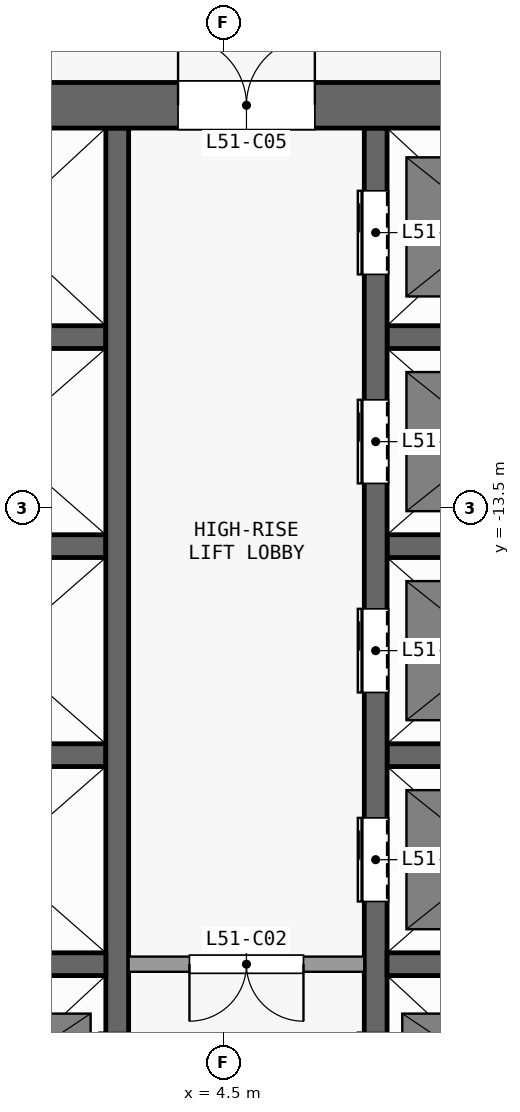
"""IFC4 building model, lengths in metres.
Left out: names, types, materials, properties, quantities, classifications, styles, units other than length and angle.
Written with IfcOpenShell. Run it as: python <this file> out.ifc"""

import sys

from ifc_helpers import new_model, si_unit, direction, frame, frame_2d, origin, place, context, subcontext, project, spatial, rectangle, extrude, element, fill, save


model = new_model("IFC4")
c1 = context("Model", 3, precision=1e-05, world=origin(), true_north=direction((0.0, 1.0)))
c2 = subcontext(c1, "Body", "Model", "MODEL_VIEW")
j1 = project(units=[si_unit("LENGTHUNIT", "METRE"), si_unit("PLANEANGLEUNIT", "RADIAN")], contexts=[c1])
p1 = place(None, origin())
s1 = spatial("IfcSite", under=j1, at=p1, CompositionType="ELEMENT")
p2 = place(p1, origin())
s2 = spatial("IfcBuilding", under=s1, at=p2, CompositionType="ELEMENT")
p3 = place(p2, frame((0.0, 0.0, 205.1)))
s3 = spatial("IfcBuildingStorey", under=s2, at=p3, CompositionType="ELEMENT", Elevation=205.1)
p4 = place(p3, frame((-13.2, -8.2, 0.0), z_axis=(0.0, 0.0, 1.0), x_axis=(1.0, 0.0, 0.0)))
e1 = element("IfcWall", 1, at=p4, inside=s3, PredefinedType="SHEAR", context=c2, shape_type="SweptSolid", body=[
    extrude(rectangle(XDim=26.4, YDim=0.6, at=frame_2d((13.2, 0.0))), origin(), (0.0, 0.0, 1.0), 3.3),
])
p5 = place(p4, frame((7.5, 0.0, 0.0)))
e2 = element("IfcOpeningElement", 2, at=p5, cuts=e1, PredefinedType="OPENING", context=c2, shape_type="SweptSolid", body=[
    extrude(rectangle(XDim=1.8, YDim=2.1, at=frame_2d((0.9, 1.05))), frame((0.0, 0.31, 0.0), z_axis=(0.0, -1.0, 0.0), x_axis=(1.0, 0.0, 0.0)), (0.0, 0.0, 1.0), 0.62),
])
p6 = place(p4, frame((17.1, 0.0, 0.0)))
e3 = element("IfcOpeningElement", 3, at=p6, cuts=e1, PredefinedType="OPENING", context=c2, shape_type="SweptSolid", body=[
    extrude(rectangle(XDim=1.8, YDim=2.1, at=frame_2d((0.9, 1.05))), frame((0.0, 0.31, 0.0), z_axis=(0.0, -1.0, 0.0), x_axis=(1.0, 0.0, 0.0)), (0.0, 0.0, 1.0), 0.62),
])
p7 = place(p4, frame((2.425, 0.0, 0.0)))
e4 = element("IfcOpeningElement", 4, at=p7, cuts=e1, PredefinedType="OPENING", context=c2, shape_type="SweptSolid", body=[
    extrude(rectangle(XDim=0.9, YDim=2.1, at=frame_2d((0.45, 1.05))), frame((0.0, 0.31, 0.0), z_axis=(0.0, -1.0, 0.0), x_axis=(1.0, 0.0, 0.0)), (0.0, 0.0, 1.0), 0.62),
])
p8 = place(p4, frame((23.775, 0.0, 0.0)))
e5 = element("IfcOpeningElement", 5, at=p8, cuts=e1, PredefinedType="OPENING", context=c2, shape_type="SweptSolid", body=[
    extrude(rectangle(XDim=1.2, YDim=2.1, at=frame_2d((0.6, 1.05))), frame((0.0, 0.31, 0.0), z_axis=(0.0, -1.0, 0.0), x_axis=(1.0, 0.0, 0.0)), (0.0, 0.0, 1.0), 0.62),
])
p9 = place(p3, frame((0.15, -19.5, 0.0), z_axis=(0.0, 0.0, 1.0), x_axis=(1.0, 0.0, 0.0)))
e6 = element("IfcWall", 6, at=p9, inside=s3, PredefinedType="SHEAR", context=c2, shape_type="SweptSolid", body=[
    extrude(rectangle(XDim=2.8, YDim=0.3, at=frame_2d((1.4, 0.0))), origin(), (0.0, 0.0, 1.0), 3.3),
])
p10 = place(p3, frame((6.35, -19.5, 0.0), z_axis=(0.0, 0.0, 1.0), x_axis=(-1.0, 0.0, 0.0)))
e7 = element("IfcWall", 7, at=p10, inside=s3, PredefinedType="PARTITIONING", context=c2, shape_type="SweptSolid", body=[
    extrude(rectangle(XDim=3.1, YDim=0.2, at=frame_2d((1.55, 0.0))), origin(), (0.0, 0.0, 1.0), 3.3),
])
p11 = place(p10, frame((0.8, 0.0, 0.0)))
e8 = element("IfcOpeningElement", 8, at=p11, cuts=e7, PredefinedType="OPENING", context=c2, shape_type="SweptSolid", body=[
    extrude(rectangle(XDim=1.5, YDim=2.1, at=frame_2d((0.75, 1.05))), frame((0.0, 0.11, 0.0), z_axis=(0.0, -1.0, 0.0), x_axis=(1.0, 0.0, 0.0)), (0.0, 0.0, 1.0), 0.22),
])
for number, where, z_axis, x_axis in (
    (9, (6.65, -19.5, 0.0), (0.0, 0.0, 1.0), (1.0, 0.0, 0.0)),
    (10, (0.15, -16.75, 0.0), (0.0, 0.0, 1.0), (1.0, 0.0, 0.0)),
    (11, (6.65, -16.75, 0.0), (0.0, 0.0, 1.0), (1.0, 0.0, 0.0)),
    (12, (0.15, -14.0, 0.0), (0.0, 0.0, 1.0), (1.0, 0.0, 0.0)),
    (13, (6.65, -14.0, 0.0), (0.0, 0.0, 1.0), (1.0, 0.0, 0.0)),
    (14, (0.15, -11.25, 0.0), (0.0, 0.0, 1.0), (1.0, 0.0, 0.0)),
    (15, (6.65, -11.25, 0.0), (0.0, 0.0, 1.0), (1.0, 0.0, 0.0)),
):
    element("IfcWall", number, at=place(p3, frame(where, z_axis=z_axis, x_axis=x_axis)), inside=s3, PredefinedType="SHEAR", context=c2, shape_type="SweptSolid", body=[
        extrude(rectangle(XDim=2.8, YDim=0.3, at=frame_2d((1.4, 0.0))), origin(), (0.0, 0.0, 1.0), 3.3),
    ])
p12 = place(p3, frame((3.1, -22.55, 0.0), z_axis=(0.0, 0.0, 1.0), x_axis=(0.0, 1.0, 0.0)))
e16 = element("IfcWall", 16, at=p12, inside=s3, PredefinedType="SHEAR", context=c2, shape_type="SweptSolid", body=[
    extrude(rectangle(XDim=14.05, YDim=0.3, at=frame_2d((7.025, 0.0))), origin(), (0.0, 0.0, 1.0), 3.3),
])
p13 = place(p12, frame((1.05, 0.0, 0.0)))
e17 = element("IfcOpeningElement", 17, at=p13, cuts=e16, PredefinedType="OPENING", context=c2, shape_type="SweptSolid", body=[
    extrude(rectangle(XDim=1.1, YDim=2.1, at=frame_2d((0.55, 1.05))), frame((0.0, 0.16, 0.0), z_axis=(0.0, -1.0, 0.0), x_axis=(1.0, 0.0, 0.0)), (0.0, 0.0, 1.0), 0.32),
])
p14 = place(p3, frame((6.5, -22.55, 0.0), z_axis=(0.0, 0.0, 1.0), x_axis=(0.0, 1.0, 0.0)))
e18 = element("IfcWall", 18, at=p14, inside=s3, PredefinedType="SHEAR", context=c2, shape_type="SweptSolid", body=[
    extrude(rectangle(XDim=14.05, YDim=0.3, at=frame_2d((7.025, 0.0))), origin(), (0.0, 0.0, 1.0), 3.3),
])
p15 = place(p14, frame((1.05, 0.0, 0.0)))
e19 = element("IfcOpeningElement", 19, at=p15, cuts=e18, PredefinedType="OPENING", context=c2, shape_type="SweptSolid", body=[
    extrude(rectangle(XDim=1.1, YDim=2.1, at=frame_2d((0.55, 1.05))), frame((0.0, 0.16, 0.0), z_axis=(0.0, -1.0, 0.0), x_axis=(1.0, 0.0, 0.0)), (0.0, 0.0, 1.0), 0.32),
])
p16 = place(p14, frame((3.875, 0.0, 0.0)))
e20 = element("IfcOpeningElement", 20, at=p16, cuts=e18, PredefinedType="OPENING", context=c2, shape_type="SweptSolid", body=[
    extrude(rectangle(XDim=1.1, YDim=2.1, at=frame_2d((0.55, 1.05))), frame((0.0, 0.16, 0.0), z_axis=(0.0, -1.0, 0.0), x_axis=(1.0, 0.0, 0.0)), (0.0, 0.0, 1.0), 0.32),
])
p17 = place(p14, frame((6.625, 0.0, 0.0)))
e21 = element("IfcOpeningElement", 21, at=p17, cuts=e18, PredefinedType="OPENING", context=c2, shape_type="SweptSolid", body=[
    extrude(rectangle(XDim=1.1, YDim=2.1, at=frame_2d((0.55, 1.05))), frame((0.0, 0.16, 0.0), z_axis=(0.0, -1.0, 0.0), x_axis=(1.0, 0.0, 0.0)), (0.0, 0.0, 1.0), 0.32),
])
p18 = place(p14, frame((9.375, 0.0, 0.0)))
e22 = element("IfcOpeningElement", 22, at=p18, cuts=e18, PredefinedType="OPENING", context=c2, shape_type="SweptSolid", body=[
    extrude(rectangle(XDim=1.1, YDim=2.1, at=frame_2d((0.55, 1.05))), frame((0.0, 0.16, 0.0), z_axis=(0.0, -1.0, 0.0), x_axis=(1.0, 0.0, 0.0)), (0.0, 0.0, 1.0), 0.32),
])
p19 = place(p14, frame((12.125, 0.0, 0.0)))
e23 = element("IfcOpeningElement", 23, at=p19, cuts=e18, PredefinedType="OPENING", context=c2, shape_type="SweptSolid", body=[
    extrude(rectangle(XDim=1.1, YDim=2.1, at=frame_2d((0.55, 1.05))), frame((0.0, 0.16, 0.0), z_axis=(0.0, -1.0, 0.0), x_axis=(1.0, 0.0, 0.0)), (0.0, 0.0, 1.0), 0.32),
])
p20 = place(p16, origin())
e24 = element("IfcDoor", 24, at=p20, inside=s3, OperationType="DOUBLE_DOOR_SLIDING", PredefinedType="DOOR", context=c2, shape_type="SweptSolid", body=[
    extrude(rectangle(XDim=1.1, YDim=2.1, at=frame_2d((0.55, 1.05))), frame((0.0, 0.025, 0.0), z_axis=(0.0, -1.0, 0.0), x_axis=(1.0, 0.0, 0.0)), (0.0, 0.0, 1.0), 0.05),
])
fill(e20, e24)
p21 = place(p17, origin())
e25 = element("IfcDoor", 25, at=p21, inside=s3, OperationType="DOUBLE_DOOR_SLIDING", PredefinedType="DOOR", context=c2, shape_type="SweptSolid", body=[
    extrude(rectangle(XDim=1.1, YDim=2.1, at=frame_2d((0.55, 1.05))), frame((0.0, 0.025, 0.0), z_axis=(0.0, -1.0, 0.0), x_axis=(1.0, 0.0, 0.0)), (0.0, 0.0, 1.0), 0.05),
])
fill(e21, e25)
p22 = place(p18, origin())
e26 = element("IfcDoor", 26, at=p22, inside=s3, OperationType="DOUBLE_DOOR_SLIDING", PredefinedType="DOOR", context=c2, shape_type="SweptSolid", body=[
    extrude(rectangle(XDim=1.1, YDim=2.1, at=frame_2d((0.55, 1.05))), frame((0.0, 0.025, 0.0), z_axis=(0.0, -1.0, 0.0), x_axis=(1.0, 0.0, 0.0)), (0.0, 0.0, 1.0), 0.05),
])
fill(e22, e26)
p23 = place(p19, origin())
e27 = element("IfcDoor", 27, at=p23, inside=s3, OperationType="DOUBLE_DOOR_SLIDING", PredefinedType="DOOR", context=c2, shape_type="SweptSolid", body=[
    extrude(rectangle(XDim=1.1, YDim=2.1, at=frame_2d((0.55, 1.05))), frame((0.0, 0.025, 0.0), z_axis=(0.0, -1.0, 0.0), x_axis=(1.0, 0.0, 0.0)), (0.0, 0.0, 1.0), 0.05),
])
fill(e23, e27)
p24 = place(p11, origin())
e28 = element("IfcDoor", 28, at=p24, inside=s3, OperationType="DOUBLE_DOOR_SINGLE_SWING", PredefinedType="DOOR", context=c2, shape_type="SweptSolid", body=[
    extrude(rectangle(XDim=1.5, YDim=2.1, at=frame_2d((0.75, 1.05))), frame((0.0, 0.025, 0.0), z_axis=(0.0, -1.0, 0.0), x_axis=(1.0, 0.0, 0.0)), (0.0, 0.0, 1.0), 0.05),
])
fill(e8, e28)
p25 = place(p6, origin())
e29 = element("IfcDoor", 29, at=p25, inside=s3, OperationType="DOUBLE_DOOR_SINGLE_SWING", PredefinedType="DOOR", context=c2, shape_type="SweptSolid", body=[
    extrude(rectangle(XDim=1.8, YDim=2.1, at=frame_2d((0.9, 1.05))), frame((0.0, 0.025, 0.0), z_axis=(0.0, -1.0, 0.0), x_axis=(1.0, 0.0, 0.0)), (0.0, 0.0, 1.0), 0.05),
])
fill(e3, e29)
save(model, sys.argv[1])
